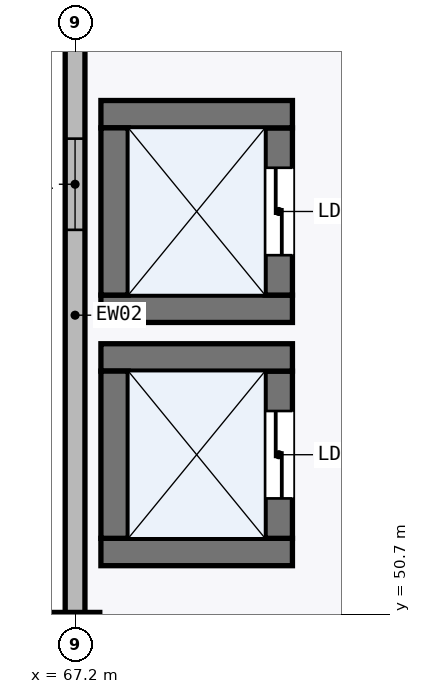
"""IFC4 building model, lengths in metres.
Left out: names, types, materials, properties, quantities, classifications, styles, units other than length and angle.
Written with IfcOpenShell. Run it as: python <this file> out.ifc"""

import sys

from ifc_helpers import new_model, si_unit, direction, frame, frame_2d, origin, origin_2d, place, context, subcontext, project, spatial, rectangle, extrude, element, fill, save


model = new_model("IFC4")
c1 = context("Model", 3, precision=1e-05, world=origin(), true_north=direction((0.0, 1.0)))
c2 = subcontext(c1, "Body", "Model", "MODEL_VIEW")
j1 = project(units=[si_unit("LENGTHUNIT", "METRE"), si_unit("PLANEANGLEUNIT", "RADIAN")], contexts=[c1])
p1 = place(None, origin())
s1 = spatial("IfcSite", under=j1, at=p1, CompositionType="ELEMENT")
p2 = place(p1, origin())
s2 = spatial("IfcBuilding", under=s1, at=p2, CompositionType="ELEMENT")
p3 = place(p2, origin())
s3 = spatial("IfcBuildingStorey", under=s2, at=p3, CompositionType="ELEMENT", Elevation=0.0)
p4 = place(p3, frame((67.2, 50.4, 0.0), z_axis=(0.0, 0.0, 1.0), x_axis=(1.0, 0.0, 0.0)))
e1 = element("IfcColumn", 1, at=p4, inside=s3, PredefinedType="COLUMN", context=c2, shape_type="SweptSolid", body=[
    extrude(rectangle(XDim=0.65, YDim=0.65, at=origin_2d()), origin(), (0.0, 0.0, 1.0), 6.0),
])
p5 = place(p3, frame((67.2, 58.551, 0.0), z_axis=(0.0, 0.0, 1.0), x_axis=(0.0, -1.0, 0.0)))
e2 = element("IfcWall", 2, at=p5, inside=s3, PredefinedType="STANDARD", context=c2, shape_type="SweptSolid", body=[
    extrude(rectangle(XDim=7.831, YDim=0.26, at=frame_2d((3.916, 0.0))), origin(), (0.0, 0.0, 1.0), 5.387),
])
p6 = place(p5, frame((1.593, 0.0, 0.95)))
e3 = element("IfcOpeningElement", 3, at=p6, cuts=e2, PredefinedType="OPENING", context=c2, shape_type="SweptSolid", body=[
    extrude(rectangle(XDim=1.2, YDim=1.8, at=frame_2d((0.6, 0.9))), frame((0.0, 0.14, 0.0), z_axis=(0.0, -1.0, 0.0), x_axis=(1.0, 0.0, 0.0)), (0.0, 0.0, 1.0), 0.28),
])
p7 = place(p3, frame((67.54, 51.52, 0.0), z_axis=(0.0, 0.0, 1.0), x_axis=(1.0, 0.0, 0.0)))
e4 = element("IfcWall", 4, at=p7, inside=s3, PredefinedType="SHEAR", context=c2, shape_type="SweptSolid", body=[
    extrude(rectangle(XDim=2.52, YDim=0.36, at=frame_2d((1.26, 0.0))), origin(), (0.0, 0.0, 1.0), 5.745),
])
p8 = place(p3, frame((69.88, 51.7, 0.0), z_axis=(0.0, 0.0, 1.0), x_axis=(0.0, 1.0, 0.0)))
e5 = element("IfcWall", 5, at=p8, inside=s3, PredefinedType="SHEAR", context=c2, shape_type="SweptSolid", body=[
    extrude(rectangle(XDim=2.2, YDim=0.36, at=frame_2d((1.1, 0.0))), origin(), (0.0, 0.0, 1.0), 5.745),
])
p9 = place(p8, frame((0.525, 0.0, 0.0)))
e6 = element("IfcOpeningElement", 6, at=p9, cuts=e5, PredefinedType="OPENING", context=c2, shape_type="SweptSolid", body=[
    extrude(rectangle(XDim=1.15, YDim=2.2, at=frame_2d((0.575, 1.1))), frame((0.0, 0.19, 0.0), z_axis=(0.0, -1.0, 0.0), x_axis=(1.0, 0.0, 0.0)), (0.0, 0.0, 1.0), 0.38),
])
p10 = place(p3, frame((70.06, 54.08, 0.0), z_axis=(0.0, 0.0, 1.0), x_axis=(-1.0, 0.0, 0.0)))
e7 = element("IfcWall", 7, at=p10, inside=s3, PredefinedType="SHEAR", context=c2, shape_type="SweptSolid", body=[
    extrude(rectangle(XDim=2.52, YDim=0.36, at=frame_2d((1.26, 0.0))), origin(), (0.0, 0.0, 1.0), 5.745),
])
p11 = place(p3, frame((67.72, 53.9, 0.0), z_axis=(0.0, 0.0, 1.0), x_axis=(0.0, -1.0, 0.0)))
e8 = element("IfcWall", 8, at=p11, inside=s3, PredefinedType="SHEAR", context=c2, shape_type="SweptSolid", body=[
    extrude(rectangle(XDim=2.2, YDim=0.36, at=frame_2d((1.1, 0.0))), origin(), (0.0, 0.0, 1.0), 5.745),
])
p12 = place(p3, frame((67.54, 54.72, 0.0), z_axis=(0.0, 0.0, 1.0), x_axis=(1.0, 0.0, 0.0)))
e9 = element("IfcWall", 9, at=p12, inside=s3, PredefinedType="SHEAR", context=c2, shape_type="SweptSolid", body=[
    extrude(rectangle(XDim=2.52, YDim=0.36, at=frame_2d((1.26, 0.0))), origin(), (0.0, 0.0, 1.0), 5.745),
])
p13 = place(p3, frame((69.88, 54.9, 0.0), z_axis=(0.0, 0.0, 1.0), x_axis=(0.0, 1.0, 0.0)))
e10 = element("IfcWall", 10, at=p13, inside=s3, PredefinedType="SHEAR", context=c2, shape_type="SweptSolid", body=[
    extrude(rectangle(XDim=2.2, YDim=0.36, at=frame_2d((1.1, 0.0))), origin(), (0.0, 0.0, 1.0), 5.745),
])
p14 = place(p13, frame((0.525, 0.0, 0.0)))
e11 = element("IfcOpeningElement", 11, at=p14, cuts=e10, PredefinedType="OPENING", context=c2, shape_type="SweptSolid", body=[
    extrude(rectangle(XDim=1.15, YDim=2.2, at=frame_2d((0.575, 1.1))), frame((0.0, 0.19, 0.0), z_axis=(0.0, -1.0, 0.0), x_axis=(1.0, 0.0, 0.0)), (0.0, 0.0, 1.0), 0.38),
])
p15 = place(p3, frame((70.06, 57.28, 0.0), z_axis=(0.0, 0.0, 1.0), x_axis=(-1.0, 0.0, 0.0)))
e12 = element("IfcWall", 12, at=p15, inside=s3, PredefinedType="SHEAR", context=c2, shape_type="SweptSolid", body=[
    extrude(rectangle(XDim=2.52, YDim=0.36, at=frame_2d((1.26, 0.0))), origin(), (0.0, 0.0, 1.0), 5.745),
])
p16 = place(p3, frame((67.72, 57.1, 0.0), z_axis=(0.0, 0.0, 1.0), x_axis=(0.0, -1.0, 0.0)))
e13 = element("IfcWall", 13, at=p16, inside=s3, PredefinedType="SHEAR", context=c2, shape_type="SweptSolid", body=[
    extrude(rectangle(XDim=2.2, YDim=0.36, at=frame_2d((1.1, 0.0))), origin(), (0.0, 0.0, 1.0), 5.745),
])
p17 = place(p6, origin())
e14 = element("IfcWindow", 14, at=p17, inside=s3, PartitioningType="SINGLE_PANEL", PredefinedType="WINDOW", context=c2, shape_type="SweptSolid", body=[
    extrude(rectangle(XDim=1.2, YDim=1.8, at=frame_2d((0.6, 0.9))), frame((0.0, 0.03, 0.0), z_axis=(0.0, -1.0, 0.0), x_axis=(1.0, 0.0, 0.0)), (0.0, 0.0, 1.0), 0.06),
])
fill(e3, e14)
p18 = place(p9, frame((1.15, 0.0, 0.0), z_axis=(0.0, 0.0, 1.0), x_axis=(-1.0, 0.0, 0.0)))
e15 = element("IfcDoor", 15, at=p18, inside=s3, OperationType="DOUBLE_DOOR_SLIDING", PredefinedType="DOOR", context=c2, shape_type="SweptSolid", body=[
    extrude(rectangle(XDim=1.15, YDim=2.2, at=frame_2d((0.575, 1.1))), frame((0.0, 0.025, 0.0), z_axis=(0.0, -1.0, 0.0), x_axis=(1.0, 0.0, 0.0)), (0.0, 0.0, 1.0), 0.05),
])
fill(e6, e15)
p19 = place(p14, frame((1.15, 0.0, 0.0), z_axis=(0.0, 0.0, 1.0), x_axis=(-1.0, 0.0, 0.0)))
e16 = element("IfcDoor", 16, at=p19, inside=s3, OperationType="DOUBLE_DOOR_SLIDING", PredefinedType="DOOR", context=c2, shape_type="SweptSolid", body=[
    extrude(rectangle(XDim=1.15, YDim=2.2, at=frame_2d((0.575, 1.1))), frame((0.0, 0.025, 0.0), z_axis=(0.0, -1.0, 0.0), x_axis=(1.0, 0.0, 0.0)), (0.0, 0.0, 1.0), 0.05),
])
fill(e11, e16)
save(model, sys.argv[1])
